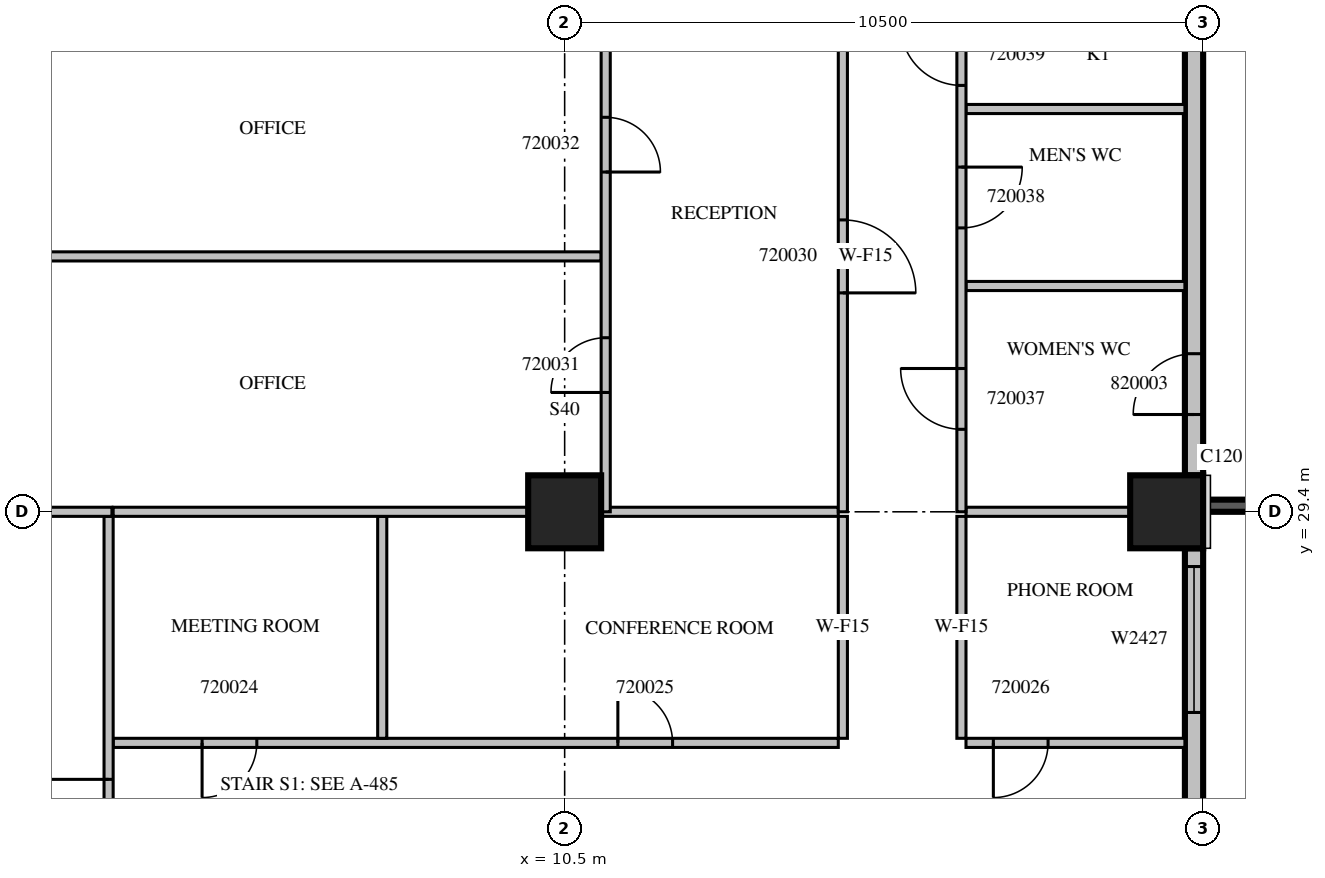
"""IFC4 building model, lengths in metres.
Left out: names, types, materials, properties, quantities, classifications, styles, units other than length and angle.
Written with IfcOpenShell. Run it as: python <this file> out.ifc"""

import sys

from ifc_helpers import new_model, si_unit, direction, frame, frame_2d, origin, origin_2d, place, context, subcontext, project, spatial, rectangle, extrude, source, transform, mapped, element, fill, save


model = new_model("IFC4")
c1 = context("Model", 3, precision=1e-05, world=origin(), true_north=direction((0.0, 1.0)))
c2 = subcontext(c1, "Body", "Model", "MODEL_VIEW")
j1 = project(units=[si_unit("LENGTHUNIT", "METRE"), si_unit("PLANEANGLEUNIT", "RADIAN")], contexts=[c1])
p1 = place(None, origin())
s1 = spatial("IfcSite", under=j1, at=p1, CompositionType="ELEMENT")
p2 = place(p1, origin())
s2 = spatial("IfcBuilding", under=s1, at=p2, CompositionType="ELEMENT")
p3 = place(p2, frame((0.0, 0.0, 95.1)))
s3 = spatial("IfcBuildingStorey", under=s2, at=p3, CompositionType="ELEMENT", Elevation=95.1)
m1 = source(origin(), c2, "Body", "SweptSolid", [
    extrude(rectangle(XDim=1.2, YDim=1.2, at=origin_2d()), origin(), (0.0, 0.0, 1.0), 4.2),
])
for number, where, z_axis, x_axis in (
    (1, (10.5, 29.4, 0.0), (0.0, 0.0, 1.0), (1.0, 0.0, 0.0)),
    (2, (20.4, 29.4, 0.0), (0.0, 0.0, 1.0), (1.0, 0.0, 0.0)),
):
    element("IfcColumn", number, at=place(p3, frame(where, z_axis=z_axis, x_axis=x_axis)), inside=s3, PredefinedType="COLUMN", context=c2, shape_type="MappedRepresentation", body=[
        mapped(m1, transform((0.0, 0.0, 0.0), scale=1.0)),
    ])
m2 = source(origin(), c2, "Body", "SweptSolid", [
    extrude(rectangle(XDim=3.9, YDim=0.2, at=frame_2d((1.95, 0.0))), origin(), (0.0, 0.0, 1.0), 3.8),
])
p4 = place(p3, frame((21.0, 29.5, 0.0), z_axis=(0.0, 0.0, 1.0), x_axis=(1.0, 0.0, 0.0)))
e3 = element("IfcWall", 3, at=p4, inside=s3, PredefinedType="SOLIDWALL", context=c2, shape_type="MappedRepresentation", body=[
    mapped(m2, transform((0.0, 0.0, 0.0), scale=1.0)),
])
m3 = source(origin(), c2, "Body", "SweptSolid", [
    extrude(rectangle(XDim=2.4, YDim=2.7, at=frame_2d((1.2, 1.35))), frame((0.0, 0.11, 0.0), z_axis=(0.0, -1.0, 0.0), x_axis=(1.0, 0.0, 0.0)), (0.0, 0.0, 1.0), 0.22),
])
p5 = place(p4, frame((0.75, 0.0, 0.6)))
e4 = element("IfcOpeningElement", 4, at=p5, cuts=e3, PredefinedType="OPENING", context=c2, shape_type="MappedRepresentation", body=[
    mapped(m3, transform((0.0, 0.0, 0.0), scale=1.0)),
])
m4 = source(origin(), c2, "Body", "SweptSolid", [
    extrude(rectangle(XDim=6.6, YDim=0.3, at=frame_2d((3.3, 0.0))), origin(), (0.0, 0.0, 1.0), 3.8),
])
p6 = place(p3, frame((20.85, 22.2, 0.0), z_axis=(0.0, 0.0, 1.0), x_axis=(0.0, 1.0, 0.0)))
e5 = element("IfcWall", 5, at=p6, inside=s3, PredefinedType="STANDARD", context=c2, shape_type="MappedRepresentation", body=[
    mapped(m4, transform((0.0, 0.0, 0.0), scale=1.0)),
])
m5 = source(origin(), c2, "Body", "SweptSolid", [
    extrude(rectangle(XDim=1.2, YDim=2.7, at=frame_2d((0.6, 1.35))), frame((0.0, 0.16, 0.0), z_axis=(0.0, -1.0, 0.0), x_axis=(1.0, 0.0, 0.0)), (0.0, 0.0, 1.0), 0.32),
])
p7 = place(p6, frame((0.3, 0.0, 0.6)))
e6 = element("IfcOpeningElement", 6, at=p7, cuts=e5, PredefinedType="OPENING", context=c2, shape_type="MappedRepresentation", body=[
    mapped(m5, transform((0.0, 0.0, 0.0), scale=1.0)),
])
m6 = source(origin(), c2, "Body", "SweptSolid", [
    extrude(rectangle(XDim=2.4, YDim=2.7, at=frame_2d((1.2, 1.35))), frame((0.0, 0.16, 0.0), z_axis=(0.0, -1.0, 0.0), x_axis=(1.0, 0.0, 0.0)), (0.0, 0.0, 1.0), 0.32),
])
p8 = place(p6, frame((3.9, 0.0, 0.6)))
e7 = element("IfcOpeningElement", 7, at=p8, cuts=e5, PredefinedType="OPENING", context=c2, shape_type="MappedRepresentation", body=[
    mapped(m6, transform((0.0, 0.0, 0.0), scale=1.0)),
])
m7 = source(origin(), c2, "Body", "SweptSolid", [
    extrude(rectangle(XDim=7.2, YDim=0.3, at=frame_2d((3.6, 0.0))), origin(), (0.0, 0.0, 1.0), 3.8),
])
p9 = place(p3, frame((20.85, 30.0, 0.0), z_axis=(0.0, 0.0, 1.0), x_axis=(0.0, 1.0, 0.0)))
e8 = element("IfcWall", 8, at=p9, inside=s3, PredefinedType="STANDARD", context=c2, shape_type="MappedRepresentation", body=[
    mapped(m7, transform((0.0, 0.0, 0.0), scale=1.0)),
])
m8 = source(origin(), c2, "Body", "SweptSolid", [
    extrude(rectangle(XDim=1.0, YDim=2.1, at=frame_2d((0.5, 1.05))), frame((0.0, 0.16, 0.0), z_axis=(0.0, -1.0, 0.0), x_axis=(1.0, 0.0, 0.0)), (0.0, 0.0, 1.0), 0.32),
])
p10 = place(p9, frame((1.0, 0.0, 0.0)))
e9 = element("IfcOpeningElement", 9, at=p10, cuts=e8, PredefinedType="OPENING", context=c2, shape_type="MappedRepresentation", body=[
    mapped(m8, transform((0.0, 0.0, 0.0), scale=1.0)),
])
m9 = source(origin(), c2, "Body", "SweptSolid", [
    extrude(rectangle(XDim=11.925, YDim=0.15, at=frame_2d((5.963, 0.0))), origin(), (0.0, 0.0, 1.0), 3.8),
])
p11 = place(p3, frame((3.075, 25.6, 0.0), z_axis=(0.0, 0.0, 1.0), x_axis=(1.0, 0.0, 0.0)))
e10 = element("IfcWall", 10, at=p11, inside=s3, PredefinedType="PARTITIONING", context=c2, shape_type="MappedRepresentation", body=[
    mapped(m9, transform((0.0, 0.0, 0.0), scale=1.0)),
])
m10 = source(origin(), c2, "Body", "SweptSolid", [
    extrude(rectangle(XDim=0.9, YDim=2.1, at=frame_2d((0.45, 1.05))), frame((0.0, 0.085, 0.0), z_axis=(0.0, -1.0, 0.0), x_axis=(1.0, 0.0, 0.0)), (0.0, 0.0, 1.0), 0.17),
])
p12 = place(p11, frame((1.462, 0.0, 0.0)))
e11 = element("IfcOpeningElement", 11, at=p12, cuts=e10, PredefinedType="OPENING", context=c2, shape_type="MappedRepresentation", body=[
    mapped(m10, transform((0.0, 0.0, 0.0), scale=1.0)),
])
p13 = place(p11, frame((8.3, 0.0, 0.0)))
e12 = element("IfcOpeningElement", 12, at=p13, cuts=e10, PredefinedType="OPENING", context=c2, shape_type="MappedRepresentation", body=[
    mapped(m10, transform((0.0, 0.0, 0.0), scale=1.0)),
])
m11 = source(origin(), c2, "Body", "SweptSolid", [
    extrude(rectangle(XDim=3.6, YDim=0.15, at=frame_2d((1.8, 0.0))), origin(), (0.0, 0.0, 1.0), 3.8),
])
p14 = place(p3, frame((17.1, 25.6, 0.0), z_axis=(0.0, 0.0, 1.0), x_axis=(1.0, 0.0, 0.0)))
e13 = element("IfcWall", 13, at=p14, inside=s3, PredefinedType="PARTITIONING", context=c2, shape_type="MappedRepresentation", body=[
    mapped(m11, transform((0.0, 0.0, 0.0), scale=1.0)),
])
p15 = place(p14, frame((0.45, 0.0, 0.0)))
e14 = element("IfcOpeningElement", 14, at=p15, cuts=e13, PredefinedType="OPENING", context=c2, shape_type="MappedRepresentation", body=[
    mapped(m10, transform((0.0, 0.0, 0.0), scale=1.0)),
])
m12 = source(origin(), c2, "Body", "SweptSolid", [
    extrude(rectangle(XDim=3.65, YDim=0.15, at=frame_2d((1.825, 0.0))), origin(), (0.0, 0.0, 1.0), 3.8),
])
for number, where, z_axis, x_axis in (
    (15, (7.5, 25.675, 0.0), (0.0, 0.0, 1.0), (0.0, 1.0, 0.0)),
    (16, (15.075, 25.675, 0.0), (0.0, 0.0, 1.0), (0.0, 1.0, 0.0)),
    (17, (17.025, 29.325, 0.0), (0.0, 0.0, 1.0), (0.0, -1.0, 0.0)),
):
    element("IfcWall", number, at=place(p3, frame(where, z_axis=z_axis, x_axis=x_axis)), inside=s3, PredefinedType="PARTITIONING", context=c2, shape_type="MappedRepresentation", body=[
        mapped(m12, transform((0.0, 0.0, 0.0), scale=1.0)),
    ])
m13 = source(origin(), c2, "Body", "SweptSolid", [
    extrude(rectangle(XDim=6.826, YDim=0.15, at=frame_2d((3.413, 0.0))), origin(), (0.0, 0.0, 1.0), 3.8),
])
p16 = place(p3, frame((9.901, 29.4, 0.0), z_axis=(0.0, 0.0, 1.0), x_axis=(-1.0, 0.0, 0.0)))
e18 = element("IfcWall", 18, at=p16, inside=s3, PredefinedType="PARTITIONING", context=c2, shape_type="MappedRepresentation", body=[
    mapped(m13, transform((0.0, 0.0, 0.0), scale=1.0)),
])
m14 = source(origin(), c2, "Body", "SweptSolid", [
    extrude(rectangle(XDim=3.901, YDim=0.15, at=frame_2d((1.95, 0.0))), origin(), (0.0, 0.0, 1.0), 3.8),
])
p17 = place(p3, frame((15.0, 29.4, 0.0), z_axis=(0.0, 0.0, 1.0), x_axis=(-1.0, 0.0, 0.0)))
e19 = element("IfcWall", 19, at=p17, inside=s3, PredefinedType="PARTITIONING", context=c2, shape_type="MappedRepresentation", body=[
    mapped(m14, transform((0.0, 0.0, 0.0), scale=1.0)),
])
m15 = source(origin(), c2, "Body", "SweptSolid", [
    extrude(rectangle(XDim=2.701, YDim=0.15, at=frame_2d((1.351, 0.0))), origin(), (0.0, 0.0, 1.0), 3.8),
])
p18 = place(p3, frame((19.801, 29.4, 0.0), z_axis=(0.0, 0.0, 1.0), x_axis=(-1.0, 0.0, 0.0)))
e20 = element("IfcWall", 20, at=p18, inside=s3, PredefinedType="PARTITIONING", context=c2, shape_type="MappedRepresentation", body=[
    mapped(m15, transform((0.0, 0.0, 0.0), scale=1.0)),
])
m16 = source(origin(), c2, "Body", "SweptSolid", [
    extrude(rectangle(XDim=7.125, YDim=0.15, at=frame_2d((3.562, 0.0))), origin(), (0.0, 0.0, 1.0), 3.8),
])
p19 = place(p3, frame((3.0, 29.325, 0.0), z_axis=(0.0, 0.0, 1.0), x_axis=(0.0, -1.0, 0.0)))
e21 = element("IfcWall", 21, at=p19, inside=s3, PredefinedType="PARTITIONING", context=c2, shape_type="MappedRepresentation", body=[
    mapped(m16, transform((0.0, 0.0, 0.0), scale=1.0)),
])
m17 = source(origin(), c2, "Body", "SweptSolid", [
    extrude(rectangle(XDim=2.2, YDim=2.1, at=frame_2d((1.1, 1.05))), frame((0.0, 0.085, 0.0), z_axis=(0.0, -1.0, 0.0), x_axis=(1.0, 0.0, 0.0)), (0.0, 0.0, 1.0), 0.17),
])
p20 = place(p19, frame((4.325, 0.0, 0.0)))
e22 = element("IfcOpeningElement", 22, at=p20, cuts=e21, PredefinedType="OPENING", context=c2, shape_type="MappedRepresentation", body=[
    mapped(m17, transform((0.0, 0.0, 0.0), scale=1.0)),
])
m18 = source(origin(), c2, "Body", "SweptSolid", [
    extrude(rectangle(XDim=10.8, YDim=0.15, at=frame_2d((5.4, 0.0))), origin(), (0.0, 0.0, 1.0), 3.8),
])
p21 = place(p3, frame((11.1, 33.6, 0.0), z_axis=(0.0, 0.0, 1.0), x_axis=(-1.0, 0.0, 0.0)))
e23 = element("IfcWall", 23, at=p21, inside=s3, PredefinedType="PARTITIONING", context=c2, shape_type="MappedRepresentation", body=[
    mapped(m18, transform((0.0, 0.0, 0.0), scale=1.0)),
])
m19 = source(origin(), c2, "Body", "SweptSolid", [
    extrude(rectangle(XDim=1.856, YDim=0.15, at=frame_2d((0.928, 0.0))), origin(), (0.0, 0.0, 1.0), 3.8),
])
p22 = place(p3, frame((3.055, 29.4, 0.0), z_axis=(0.0, 0.0, 1.0), x_axis=(-1.0, 0.0, 0.0)))
e24 = element("IfcWall", 24, at=p22, inside=s3, PredefinedType="PARTITIONING", context=c2, shape_type="MappedRepresentation", body=[
    mapped(m19, transform((0.0, 0.0, 0.0), scale=1.0)),
])
m20 = source(origin(), c2, "Body", "SweptSolid", [
    extrude(rectangle(XDim=8.4, YDim=0.15, at=frame_2d((4.2, 0.0))), origin(), (0.0, 0.0, 1.0), 3.8),
])
p23 = place(p3, frame((11.175, 29.4, 0.0), z_axis=(0.0, 0.0, 1.0), x_axis=(0.0, 1.0, 0.0)))
e25 = element("IfcWall", 25, at=p23, inside=s3, PredefinedType="PARTITIONING", context=c2, shape_type="MappedRepresentation", body=[
    mapped(m20, transform((0.0, 0.0, 0.0), scale=1.0)),
])
p24 = place(p23, frame((1.962, 0.0, 0.0)))
e26 = element("IfcOpeningElement", 26, at=p24, cuts=e25, PredefinedType="OPENING", context=c2, shape_type="MappedRepresentation", body=[
    mapped(m10, transform((0.0, 0.0, 0.0), scale=1.0)),
])
p25 = place(p23, frame((5.588, 0.0, 0.0)))
e27 = element("IfcOpeningElement", 27, at=p25, cuts=e25, PredefinedType="OPENING", context=c2, shape_type="MappedRepresentation", body=[
    mapped(m10, transform((0.0, 0.0, 0.0), scale=1.0)),
])
for number, where, z_axis, x_axis in (
    (28, (17.1, 33.113, 0.0), (0.0, 0.0, 1.0), (1.0, 0.0, 0.0)),
    (29, (17.1, 36.024, 0.0), (0.0, 0.0, 1.0), (1.0, 0.0, 0.0)),
):
    element("IfcWall", number, at=place(p3, frame(where, z_axis=z_axis, x_axis=x_axis)), inside=s3, PredefinedType="PARTITIONING", context=c2, shape_type="MappedRepresentation", body=[
        mapped(m11, transform((0.0, 0.0, 0.0), scale=1.0)),
    ])
p26 = place(p3, frame((15.075, 29.4, 0.0), z_axis=(0.0, 0.0, 1.0), x_axis=(0.0, 1.0, 0.0)))
e30 = element("IfcWall", 30, at=p26, inside=s3, PredefinedType="PARTITIONING", context=c2, shape_type="MappedRepresentation", body=[
    mapped(m20, transform((0.0, 0.0, 0.0), scale=1.0)),
])
m21 = source(origin(), c2, "Body", "SweptSolid", [
    extrude(rectangle(XDim=1.2, YDim=2.1, at=frame_2d((0.6, 1.05))), frame((0.0, 0.085, 0.0), z_axis=(0.0, -1.0, 0.0), x_axis=(1.0, 0.0, 0.0)), (0.0, 0.0, 1.0), 0.17),
])
p27 = place(p26, frame((3.6, 0.0, 0.0)))
e31 = element("IfcOpeningElement", 31, at=p27, cuts=e30, PredefinedType="OPENING", context=c2, shape_type="MappedRepresentation", body=[
    mapped(m21, transform((0.0, 0.0, 0.0), scale=1.0)),
])
m22 = source(origin(), c2, "Body", "SweptSolid", [
    extrude(rectangle(XDim=24.155, YDim=0.15, at=frame_2d((12.078, 0.0))), origin(), (0.0, 0.0, 1.0), 3.8),
])
p28 = place(p3, frame((17.025, 53.555, 0.0), z_axis=(0.0, 0.0, 1.0), x_axis=(0.0, -1.0, 0.0)))
e32 = element("IfcWall", 32, at=p28, inside=s3, PredefinedType="PARTITIONING", context=c2, shape_type="MappedRepresentation", body=[
    mapped(m22, transform((0.0, 0.0, 0.0), scale=1.0)),
])
m23 = source(origin(), c2, "Body", "SweptSolid", [
    extrude(rectangle(XDim=1.0, YDim=2.1, at=frame_2d((0.5, 1.05))), frame((0.0, 0.085, 0.0), z_axis=(0.0, -1.0, 0.0), x_axis=(1.0, 0.0, 0.0)), (0.0, 0.0, 1.0), 0.17),
])
p29 = place(p28, frame((21.798, 0.0, 0.0)))
e33 = element("IfcOpeningElement", 33, at=p29, cuts=e32, PredefinedType="OPENING", context=c2, shape_type="MappedRepresentation", body=[
    mapped(m23, transform((0.0, 0.0, 0.0), scale=1.0)),
])
p30 = place(p28, frame((18.486, 0.0, 0.0)))
e34 = element("IfcOpeningElement", 34, at=p30, cuts=e32, PredefinedType="OPENING", context=c2, shape_type="MappedRepresentation", body=[
    mapped(m23, transform((0.0, 0.0, 0.0), scale=1.0)),
])
p31 = place(p28, frame((16.143, 0.0, 0.0)))
e35 = element("IfcOpeningElement", 35, at=p31, cuts=e32, PredefinedType="OPENING", context=c2, shape_type="MappedRepresentation", body=[
    mapped(m23, transform((0.0, 0.0, 0.0), scale=1.0)),
])
p32 = place(p28, frame((13.205, 0.0, 0.0)))
e36 = element("IfcOpeningElement", 36, at=p32, cuts=e32, PredefinedType="OPENING", context=c2, shape_type="MappedRepresentation", body=[
    mapped(m10, transform((0.0, 0.0, 0.0), scale=1.0)),
])
p33 = place(p28, frame((9.005, 0.0, 0.0)))
e37 = element("IfcOpeningElement", 37, at=p33, cuts=e32, PredefinedType="OPENING", context=c2, shape_type="MappedRepresentation", body=[
    mapped(m10, transform((0.0, 0.0, 0.0), scale=1.0)),
])
p34 = place(p28, frame((4.651, 0.0, 0.0)))
e38 = element("IfcOpeningElement", 38, at=p34, cuts=e32, PredefinedType="OPENING", context=c2, shape_type="MappedRepresentation", body=[
    mapped(m10, transform((0.0, 0.0, 0.0), scale=1.0)),
])
p35 = place(p28, frame((0.144, 0.0, 0.0)))
e39 = element("IfcOpeningElement", 39, at=p35, cuts=e32, PredefinedType="OPENING", context=c2, shape_type="MappedRepresentation", body=[
    mapped(m10, transform((0.0, 0.0, 0.0), scale=1.0)),
])
m24 = source(origin(), c2, "Body", "SweptSolid", [
    extrude(rectangle(XDim=2.4, YDim=2.7, at=frame_2d((1.2, 1.35))), frame((0.0, 0.03, 0.0), z_axis=(0.0, -1.0, 0.0), x_axis=(1.0, 0.0, 0.0)), (0.0, 0.0, 1.0), 0.06),
])
p36 = place(p8, origin())
e40 = element("IfcWindow", 40, at=p36, inside=s3, PartitioningType="SINGLE_PANEL", PredefinedType="WINDOW", context=c2, shape_type="MappedRepresentation", body=[
    mapped(m24, transform((0.0, 0.0, 0.0), scale=1.0)),
])
fill(e7, e40)
m25 = source(origin(), c2, "Body", "SweptSolid", [
    extrude(rectangle(XDim=0.9, YDim=2.1, at=frame_2d((0.45, 1.05))), frame((0.0, 0.025, 0.0), z_axis=(0.0, -1.0, 0.0), x_axis=(1.0, 0.0, 0.0)), (0.0, 0.0, 1.0), 0.05),
])
p37 = place(p12, origin())
e41 = element("IfcDoor", 41, at=p37, inside=s3, OperationType="SINGLE_SWING_RIGHT", PredefinedType="DOOR", context=c2, shape_type="MappedRepresentation", body=[
    mapped(m25, transform((0.0, 0.0, 0.0), scale=1.0)),
])
fill(e11, e41)
p38 = place(p13, origin())
e42 = element("IfcDoor", 42, at=p38, inside=s3, OperationType="SINGLE_SWING_LEFT", PredefinedType="DOOR", context=c2, shape_type="MappedRepresentation", body=[
    mapped(m25, transform((0.0, 0.0, 0.0), scale=1.0)),
])
fill(e12, e42)
p39 = place(p15, origin())
e43 = element("IfcDoor", 43, at=p39, inside=s3, OperationType="SINGLE_SWING_RIGHT", PredefinedType="DOOR", context=c2, shape_type="MappedRepresentation", body=[
    mapped(m25, transform((0.0, 0.0, 0.0), scale=1.0)),
])
fill(e14, e43)
m26 = source(origin(), c2, "Body", "SweptSolid", [
    extrude(rectangle(XDim=2.2, YDim=2.1, at=frame_2d((1.1, 1.05))), frame((0.0, 0.025, 0.0), z_axis=(0.0, -1.0, 0.0), x_axis=(1.0, 0.0, 0.0)), (0.0, 0.0, 1.0), 0.05),
])
p40 = place(p20, origin())
e44 = element("IfcDoor", 44, at=p40, inside=s3, OperationType="DOUBLE_DOOR_SINGLE_SWING", PredefinedType="DOOR", context=c2, shape_type="MappedRepresentation", body=[
    mapped(m26, transform((0.0, 0.0, 0.0), scale=1.0)),
])
fill(e22, e44)
m27 = source(origin(), c2, "Body", "SweptSolid", [
    extrude(rectangle(XDim=1.2, YDim=2.1, at=frame_2d((0.6, 1.05))), frame((0.0, 0.025, 0.0), z_axis=(0.0, -1.0, 0.0), x_axis=(1.0, 0.0, 0.0)), (0.0, 0.0, 1.0), 0.05),
])
p41 = place(p27, origin())
e45 = element("IfcDoor", 45, at=p41, inside=s3, OperationType="SINGLE_SWING_RIGHT", PredefinedType="DOOR", context=c2, shape_type="MappedRepresentation", body=[
    mapped(m27, transform((0.0, 0.0, 0.0), scale=1.0)),
])
fill(e31, e45)
p42 = place(p24, origin())
e46 = element("IfcDoor", 46, at=p42, inside=s3, OperationType="SINGLE_SWING_LEFT", PredefinedType="DOOR", context=c2, shape_type="MappedRepresentation", body=[
    mapped(m25, transform((0.0, 0.0, 0.0), scale=1.0)),
])
fill(e26, e46)
p43 = place(p25, origin())
e47 = element("IfcDoor", 47, at=p43, inside=s3, OperationType="SINGLE_SWING_RIGHT", PredefinedType="DOOR", context=c2, shape_type="MappedRepresentation", body=[
    mapped(m25, transform((0.0, 0.0, 0.0), scale=1.0)),
])
fill(e27, e47)
m28 = source(origin(), c2, "Body", "SweptSolid", [
    extrude(rectangle(XDim=1.0, YDim=2.1, at=frame_2d((0.5, 1.05))), frame((0.0, 0.025, 0.0), z_axis=(0.0, -1.0, 0.0), x_axis=(1.0, 0.0, 0.0)), (0.0, 0.0, 1.0), 0.05),
])
p44 = place(p29, origin())
e48 = element("IfcDoor", 48, at=p44, inside=s3, OperationType="SINGLE_SWING_RIGHT", PredefinedType="DOOR", context=c2, shape_type="MappedRepresentation", body=[
    mapped(m28, transform((0.0, 0.0, 0.0), scale=1.0)),
])
fill(e33, e48)
p45 = place(p30, origin())
e49 = element("IfcDoor", 49, at=p45, inside=s3, OperationType="SINGLE_SWING_LEFT", PredefinedType="DOOR", context=c2, shape_type="MappedRepresentation", body=[
    mapped(m28, transform((0.0, 0.0, 0.0), scale=1.0)),
])
fill(e34, e49)
p46 = place(p31, origin())
e50 = element("IfcDoor", 50, at=p46, inside=s3, OperationType="SINGLE_SWING_RIGHT", PredefinedType="DOOR", context=c2, shape_type="MappedRepresentation", body=[
    mapped(m28, transform((0.0, 0.0, 0.0), scale=1.0)),
])
fill(e35, e50)
p47 = place(p10, origin())
e51 = element("IfcDoor", 51, at=p47, inside=s3, OperationType="SINGLE_SWING_LEFT", PredefinedType="DOOR", context=c2, shape_type="MappedRepresentation", body=[
    mapped(m28, transform((0.0, 0.0, 0.0), scale=1.0)),
])
fill(e9, e51)
save(model, sys.argv[1])
